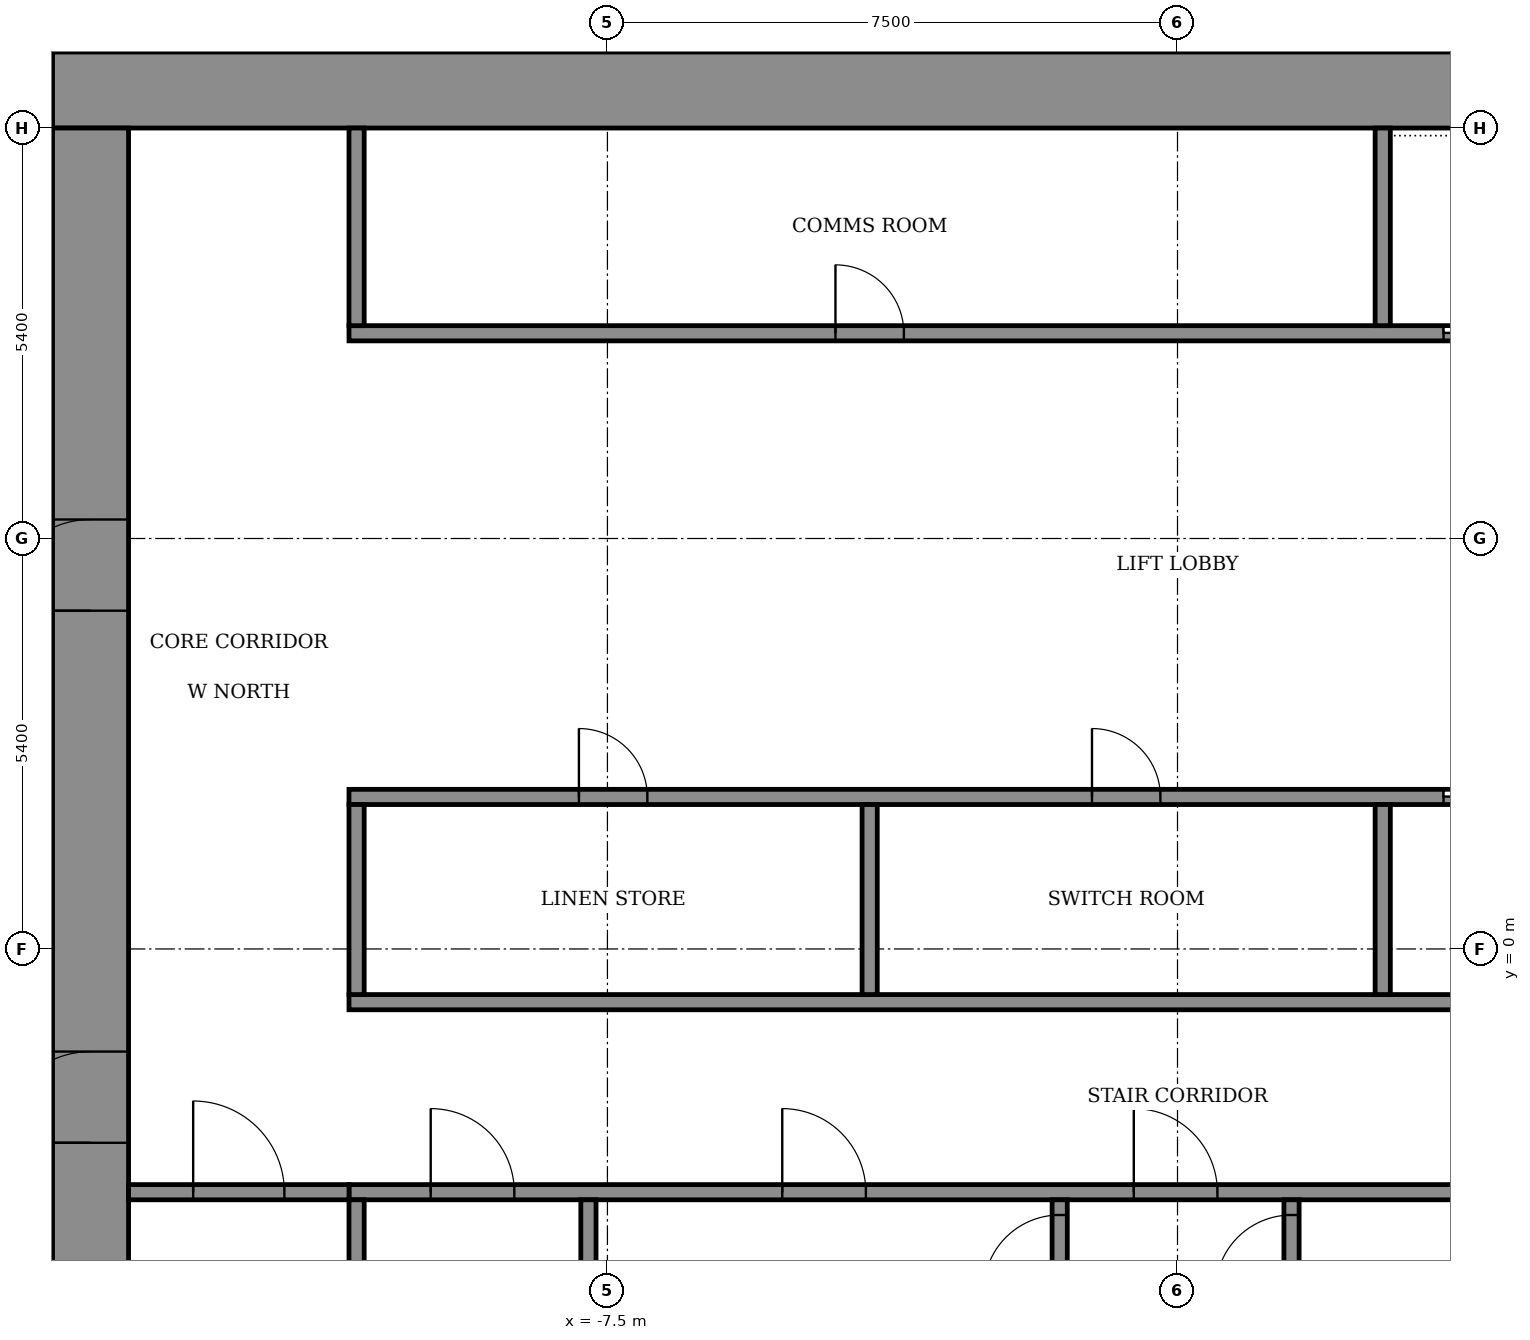
"""IFC4 building model, lengths in metres.
Left out: names, types, materials, properties, quantities, classifications, styles, units other than length and angle.
Written with IfcOpenShell. Run it as: python <this file> out.ifc"""

import sys

from ifc_helpers import new_model, si_unit, direction, frame, frame_2d, origin, place, context, subcontext, project, spatial, rectangle, extrude, element, fill, save


model = new_model("IFC4")
c1 = context("Model", 3, precision=1e-05, world=origin(), true_north=direction((0.0, 1.0)))
c2 = subcontext(c1, "Body", "Model", "MODEL_VIEW")
j1 = project(units=[si_unit("LENGTHUNIT", "METRE"), si_unit("PLANEANGLEUNIT", "RADIAN")], contexts=[c1])
p1 = place(None, origin())
s1 = spatial("IfcSite", under=j1, at=p1, CompositionType="ELEMENT")
p2 = place(p1, origin())
s2 = spatial("IfcBuilding", under=s1, at=p2, CompositionType="ELEMENT")
p3 = place(p2, frame((0.0, 0.0, 125.5)))
s3 = spatial("IfcBuildingStorey", under=s2, at=p3, CompositionType="ELEMENT", Elevation=125.5)
p4 = place(p3, frame((-14.8, 11.3, 0.0), z_axis=(0.0, 0.0, 1.0), x_axis=(1.0, 0.0, 0.0)))
e1 = element("IfcWall", 1, at=p4, inside=s3, PredefinedType="SHEAR", context=c2, shape_type="SweptSolid", body=[
    extrude(rectangle(XDim=29.6, YDim=1.0, at=frame_2d((14.8, 0.0))), origin(), (0.0, 0.0, 1.0), 4.6),
])
p5 = place(p3, frame((-14.3, -10.8, 0.0), z_axis=(0.0, 0.0, 1.0), x_axis=(0.0, 1.0, 0.0)))
e2 = element("IfcWall", 2, at=p5, inside=s3, PredefinedType="SHEAR", context=c2, shape_type="SweptSolid", body=[
    extrude(rectangle(XDim=21.6, YDim=1.0, at=frame_2d((10.8, 0.0))), origin(), (0.0, 0.0, 1.0), 4.6),
])
p6 = place(p5, frame((8.25, 0.0, 0.0)))
e3 = element("IfcOpeningElement", 3, at=p6, cuts=e2, PredefinedType="OPENING", context=c2, shape_type="SweptSolid", body=[
    extrude(rectangle(XDim=1.2, YDim=2.1, at=frame_2d((0.6, 1.05))), frame((0.0, 0.51, 0.0), z_axis=(0.0, -1.0, 0.0), x_axis=(1.0, 0.0, 0.0)), (0.0, 0.0, 1.0), 1.02),
])
p7 = place(p5, frame((15.25, 0.0, 0.0)))
e4 = element("IfcOpeningElement", 4, at=p7, cuts=e2, PredefinedType="OPENING", context=c2, shape_type="SweptSolid", body=[
    extrude(rectangle(XDim=1.2, YDim=2.1, at=frame_2d((0.6, 1.05))), frame((0.0, 0.51, 0.0), z_axis=(0.0, -1.0, 0.0), x_axis=(1.0, 0.0, 0.0)), (0.0, 0.0, 1.0), 1.02),
])
p8 = place(p3, frame((-10.9, -3.2, 0.0), z_axis=(0.0, 0.0, 1.0), x_axis=(1.0, 0.0, 0.0)))
e5 = element("IfcWall", 5, at=p8, inside=s3, PredefinedType="SHEAR", context=c2, shape_type="SweptSolid", body=[
    extrude(rectangle(XDim=21.8, YDim=0.2, at=frame_2d((10.9, 0.0))), origin(), (0.0, 0.0, 1.0), 4.05),
])
p9 = place(p8, frame((1.075, 0.0, 0.0)))
e6 = element("IfcOpeningElement", 6, at=p9, cuts=e5, PredefinedType="OPENING", context=c2, shape_type="SweptSolid", body=[
    extrude(rectangle(XDim=1.1, YDim=2.1, at=frame_2d((0.55, 1.05))), frame((0.0, 0.11, 0.0), z_axis=(0.0, -1.0, 0.0), x_axis=(1.0, 0.0, 0.0)), (0.0, 0.0, 1.0), 0.22),
])
p10 = place(p8, frame((10.325, 0.0, 0.0)))
e7 = element("IfcOpeningElement", 7, at=p10, cuts=e5, PredefinedType="OPENING", context=c2, shape_type="SweptSolid", body=[
    extrude(rectangle(XDim=1.1, YDim=2.1, at=frame_2d((0.55, 1.05))), frame((0.0, 0.11, 0.0), z_axis=(0.0, -1.0, 0.0), x_axis=(1.0, 0.0, 0.0)), (0.0, 0.0, 1.0), 0.22),
])
p11 = place(p8, frame((19.625, 0.0, 0.0)))
e8 = element("IfcOpeningElement", 8, at=p11, cuts=e5, PredefinedType="OPENING", context=c2, shape_type="SweptSolid", body=[
    extrude(rectangle(XDim=1.1, YDim=2.1, at=frame_2d((0.55, 1.05))), frame((0.0, 0.11, 0.0), z_axis=(0.0, -1.0, 0.0), x_axis=(1.0, 0.0, 0.0)), (0.0, 0.0, 1.0), 0.22),
])
p12 = place(p8, frame((5.7, 0.0, 0.0)))
e9 = element("IfcOpeningElement", 9, at=p12, cuts=e5, PredefinedType="OPENING", context=c2, shape_type="SweptSolid", body=[
    extrude(rectangle(XDim=1.1, YDim=2.1, at=frame_2d((0.55, 1.05))), frame((0.0, 0.11, 0.0), z_axis=(0.0, -1.0, 0.0), x_axis=(1.0, 0.0, 0.0)), (0.0, 0.0, 1.0), 0.22),
])
p13 = place(p8, frame((14.975, 0.0, 0.0)))
e10 = element("IfcOpeningElement", 10, at=p13, cuts=e5, PredefinedType="OPENING", context=c2, shape_type="SweptSolid", body=[
    extrude(rectangle(XDim=1.1, YDim=2.1, at=frame_2d((0.55, 1.05))), frame((0.0, 0.11, 0.0), z_axis=(0.0, -1.0, 0.0), x_axis=(1.0, 0.0, 0.0)), (0.0, 0.0, 1.0), 0.22),
])
p14 = place(p3, frame((-10.9, -0.7, 0.0), z_axis=(0.0, 0.0, 1.0), x_axis=(1.0, 0.0, 0.0)))
e11 = element("IfcWall", 11, at=p14, inside=s3, PredefinedType="SHEAR", context=c2, shape_type="SweptSolid", body=[
    extrude(rectangle(XDim=21.8, YDim=0.2, at=frame_2d((10.9, 0.0))), origin(), (0.0, 0.0, 1.0), 4.05),
])
p15 = place(p3, frame((-10.9, 2.0, 0.0), z_axis=(0.0, 0.0, 1.0), x_axis=(1.0, 0.0, 0.0)))
e12 = element("IfcWall", 12, at=p15, inside=s3, PredefinedType="SHEAR", context=c2, shape_type="SweptSolid", body=[
    extrude(rectangle(XDim=21.8, YDim=0.2, at=frame_2d((10.9, 0.0))), origin(), (0.0, 0.0, 1.0), 4.05),
])
p16 = place(p15, frame((14.4, 0.0, 0.0)))
e13 = element("IfcOpeningElement", 13, at=p16, cuts=e12, PredefinedType="OPENING", context=c2, shape_type="SweptSolid", body=[
    extrude(rectangle(XDim=1.1, YDim=2.1, at=frame_2d((0.55, 1.05))), frame((0.0, 0.11, 0.0), z_axis=(0.0, -1.0, 0.0), x_axis=(1.0, 0.0, 0.0)), (0.0, 0.0, 1.0), 0.22),
])
p17 = place(p15, frame((17.1, 0.0, 0.0)))
e14 = element("IfcOpeningElement", 14, at=p17, cuts=e12, PredefinedType="OPENING", context=c2, shape_type="SweptSolid", body=[
    extrude(rectangle(XDim=1.1, YDim=2.1, at=frame_2d((0.55, 1.05))), frame((0.0, 0.11, 0.0), z_axis=(0.0, -1.0, 0.0), x_axis=(1.0, 0.0, 0.0)), (0.0, 0.0, 1.0), 0.22),
])
p18 = place(p15, frame((19.8, 0.0, 0.0)))
e15 = element("IfcOpeningElement", 15, at=p18, cuts=e12, PredefinedType="OPENING", context=c2, shape_type="SweptSolid", body=[
    extrude(rectangle(XDim=1.1, YDim=2.1, at=frame_2d((0.55, 1.05))), frame((0.0, 0.11, 0.0), z_axis=(0.0, -1.0, 0.0), x_axis=(1.0, 0.0, 0.0)), (0.0, 0.0, 1.0), 0.22),
])
p19 = place(p15, frame((3.025, 0.0, 0.0)))
e16 = element("IfcOpeningElement", 16, at=p19, cuts=e12, PredefinedType="OPENING", context=c2, shape_type="SweptSolid", body=[
    extrude(rectangle(XDim=0.9, YDim=2.1, at=frame_2d((0.45, 1.05))), frame((0.0, 0.11, 0.0), z_axis=(0.0, -1.0, 0.0), x_axis=(1.0, 0.0, 0.0)), (0.0, 0.0, 1.0), 0.22),
])
p20 = place(p15, frame((9.775, 0.0, 0.0)))
e17 = element("IfcOpeningElement", 17, at=p20, cuts=e12, PredefinedType="OPENING", context=c2, shape_type="SweptSolid", body=[
    extrude(rectangle(XDim=0.9, YDim=2.1, at=frame_2d((0.45, 1.05))), frame((0.0, 0.11, 0.0), z_axis=(0.0, -1.0, 0.0), x_axis=(1.0, 0.0, 0.0)), (0.0, 0.0, 1.0), 0.22),
])
p21 = place(p3, frame((-10.9, 8.1, 0.0), z_axis=(0.0, 0.0, 1.0), x_axis=(1.0, 0.0, 0.0)))
e18 = element("IfcWall", 18, at=p21, inside=s3, PredefinedType="SHEAR", context=c2, shape_type="SweptSolid", body=[
    extrude(rectangle(XDim=21.8, YDim=0.2, at=frame_2d((10.9, 0.0))), origin(), (0.0, 0.0, 1.0), 4.05),
])
p22 = place(p21, frame((14.4, 0.0, 0.0)))
e19 = element("IfcOpeningElement", 19, at=p22, cuts=e18, PredefinedType="OPENING", context=c2, shape_type="SweptSolid", body=[
    extrude(rectangle(XDim=1.1, YDim=2.1, at=frame_2d((0.55, 1.05))), frame((0.0, 0.11, 0.0), z_axis=(0.0, -1.0, 0.0), x_axis=(1.0, 0.0, 0.0)), (0.0, 0.0, 1.0), 0.22),
])
p23 = place(p21, frame((17.1, 0.0, 0.0)))
e20 = element("IfcOpeningElement", 20, at=p23, cuts=e18, PredefinedType="OPENING", context=c2, shape_type="SweptSolid", body=[
    extrude(rectangle(XDim=1.1, YDim=2.1, at=frame_2d((0.55, 1.05))), frame((0.0, 0.11, 0.0), z_axis=(0.0, -1.0, 0.0), x_axis=(1.0, 0.0, 0.0)), (0.0, 0.0, 1.0), 0.22),
])
p24 = place(p21, frame((19.8, 0.0, 0.0)))
e21 = element("IfcOpeningElement", 21, at=p24, cuts=e18, PredefinedType="OPENING", context=c2, shape_type="SweptSolid", body=[
    extrude(rectangle(XDim=1.1, YDim=2.1, at=frame_2d((0.55, 1.05))), frame((0.0, 0.11, 0.0), z_axis=(0.0, -1.0, 0.0), x_axis=(1.0, 0.0, 0.0)), (0.0, 0.0, 1.0), 0.22),
])
p25 = place(p21, frame((6.4, 0.0, 0.0)))
e22 = element("IfcOpeningElement", 22, at=p25, cuts=e18, PredefinedType="OPENING", context=c2, shape_type="SweptSolid", body=[
    extrude(rectangle(XDim=0.9, YDim=2.1, at=frame_2d((0.45, 1.05))), frame((0.0, 0.11, 0.0), z_axis=(0.0, -1.0, 0.0), x_axis=(1.0, 0.0, 0.0)), (0.0, 0.0, 1.0), 0.22),
])
for number, where, z_axis, x_axis in (
    (23, (-10.8, -10.8, 0.0), (0.0, 0.0, 1.0), (0.0, 1.0, 0.0)),
    (24, (-7.75, -10.8, 0.0), (0.0, 0.0, 1.0), (0.0, 1.0, 0.0)),
):
    element("IfcWall", number, at=place(p3, frame(where, z_axis=z_axis, x_axis=x_axis)), inside=s3, PredefinedType="SHEAR", context=c2, shape_type="SweptSolid", body=[
        extrude(rectangle(XDim=7.5, YDim=0.2, at=frame_2d((3.75, 0.0))), origin(), (0.0, 0.0, 1.0), 4.05),
    ])
p26 = place(p3, frame((-1.55, -10.8, 0.0), z_axis=(0.0, 0.0, 1.0), x_axis=(0.0, 1.0, 0.0)))
e25 = element("IfcWall", 25, at=p26, inside=s3, PredefinedType="SHEAR", context=c2, shape_type="SweptSolid", body=[
    extrude(rectangle(XDim=7.5, YDim=0.2, at=frame_2d((3.75, 0.0))), origin(), (0.0, 0.0, 1.0), 4.05),
])
p27 = place(p26, frame((6.3, 0.0, 0.0)))
e26 = element("IfcOpeningElement", 26, at=p27, cuts=e25, PredefinedType="OPENING", context=c2, shape_type="SweptSolid", body=[
    extrude(rectangle(XDim=1.0, YDim=2.1, at=frame_2d((0.5, 1.05))), frame((0.0, 0.11, 0.0), z_axis=(0.0, -1.0, 0.0), x_axis=(1.0, 0.0, 0.0)), (0.0, 0.0, 1.0), 0.22),
])
p28 = place(p3, frame((1.5, -10.8, 0.0), z_axis=(0.0, 0.0, 1.0), x_axis=(0.0, 1.0, 0.0)))
e27 = element("IfcWall", 27, at=p28, inside=s3, PredefinedType="SHEAR", context=c2, shape_type="SweptSolid", body=[
    extrude(rectangle(XDim=7.5, YDim=0.2, at=frame_2d((3.75, 0.0))), origin(), (0.0, 0.0, 1.0), 4.05),
])
p29 = place(p28, frame((6.3, 0.0, 0.0)))
e28 = element("IfcOpeningElement", 28, at=p29, cuts=e27, PredefinedType="OPENING", context=c2, shape_type="SweptSolid", body=[
    extrude(rectangle(XDim=1.0, YDim=2.1, at=frame_2d((0.5, 1.05))), frame((0.0, 0.11, 0.0), z_axis=(0.0, -1.0, 0.0), x_axis=(1.0, 0.0, 0.0)), (0.0, 0.0, 1.0), 0.22),
])
for number, where, z_axis, x_axis in (
    (29, (-10.8, -0.6, 0.0), (0.0, 0.0, 1.0), (0.0, 1.0, 0.0)),
    (30, (-4.05, -0.6, 0.0), (0.0, 0.0, 1.0), (0.0, 1.0, 0.0)),
):
    element("IfcWall", number, at=place(p3, frame(where, z_axis=z_axis, x_axis=x_axis)), inside=s3, PredefinedType="STANDARD", context=c2, shape_type="SweptSolid", body=[
        extrude(rectangle(XDim=2.5, YDim=0.2, at=frame_2d((1.25, 0.0))), origin(), (0.0, 0.0, 1.0), 4.05),
    ])
p30 = place(p3, frame((2.7, -0.6, 0.0), z_axis=(0.0, 0.0, 1.0), x_axis=(0.0, 1.0, 0.0)))
e31 = element("IfcWall", 31, at=p30, inside=s3, PredefinedType="SHEAR", context=c2, shape_type="SweptSolid", body=[
    extrude(rectangle(XDim=2.5, YDim=0.2, at=frame_2d((1.25, 0.0))), origin(), (0.0, 0.0, 1.0), 4.05),
])
p31 = place(p3, frame((-10.8, 8.2, 0.0), z_axis=(0.0, 0.0, 1.0), x_axis=(0.0, 1.0, 0.0)))
e32 = element("IfcWall", 32, at=p31, inside=s3, PredefinedType="STANDARD", context=c2, shape_type="SweptSolid", body=[
    extrude(rectangle(XDim=2.6, YDim=0.2, at=frame_2d((1.3, 0.0))), origin(), (0.0, 0.0, 1.0), 4.05),
])
p32 = place(p3, frame((2.7, 8.2, 0.0), z_axis=(0.0, 0.0, 1.0), x_axis=(0.0, 1.0, 0.0)))
e33 = element("IfcWall", 33, at=p32, inside=s3, PredefinedType="SHEAR", context=c2, shape_type="SweptSolid", body=[
    extrude(rectangle(XDim=2.6, YDim=0.2, at=frame_2d((1.3, 0.0))), origin(), (0.0, 0.0, 1.0), 4.05),
])
p33 = place(p3, frame((-13.8, -3.2, 0.0), z_axis=(0.0, 0.0, 1.0), x_axis=(1.0, 0.0, 0.0)))
e34 = element("IfcWall", 34, at=p33, inside=s3, PredefinedType="STANDARD", context=c2, shape_type="SweptSolid", body=[
    extrude(rectangle(XDim=2.9, YDim=0.2, at=frame_2d((1.45, 0.0))), origin(), (0.0, 0.0, 1.0), 4.05),
])
p34 = place(p33, frame((0.85, 0.0, 0.0)))
e35 = element("IfcOpeningElement", 35, at=p34, cuts=e34, PredefinedType="OPENING", context=c2, shape_type="SweptSolid", body=[
    extrude(rectangle(XDim=1.2, YDim=2.1, at=frame_2d((0.6, 1.05))), frame((0.0, 0.11, 0.0), z_axis=(0.0, -1.0, 0.0), x_axis=(1.0, 0.0, 0.0)), (0.0, 0.0, 1.0), 0.22),
])
p35 = place(p6, origin())
e36 = element("IfcDoor", 36, at=p35, inside=s3, OperationType="DOUBLE_DOOR_SINGLE_SWING", PredefinedType="DOOR", context=c2, shape_type="SweptSolid", body=[
    extrude(rectangle(XDim=1.2, YDim=2.1, at=frame_2d((0.6, 1.05))), frame((0.0, 0.025, 0.0), z_axis=(0.0, -1.0, 0.0), x_axis=(1.0, 0.0, 0.0)), (0.0, 0.0, 1.0), 0.05),
])
fill(e3, e36)
p36 = place(p7, origin())
e37 = element("IfcDoor", 37, at=p36, inside=s3, OperationType="DOUBLE_DOOR_SINGLE_SWING", PredefinedType="DOOR", context=c2, shape_type="SweptSolid", body=[
    extrude(rectangle(XDim=1.2, YDim=2.1, at=frame_2d((0.6, 1.05))), frame((0.0, 0.025, 0.0), z_axis=(0.0, -1.0, 0.0), x_axis=(1.0, 0.0, 0.0)), (0.0, 0.0, 1.0), 0.05),
])
fill(e4, e37)
p37 = place(p16, origin())
e38 = element("IfcDoor", 38, at=p37, inside=s3, OperationType="SLIDING_TO_LEFT", PredefinedType="DOOR", context=c2, shape_type="SweptSolid", body=[
    extrude(rectangle(XDim=1.1, YDim=2.1, at=frame_2d((0.55, 1.05))), frame((0.0, 0.025, 0.0), z_axis=(0.0, -1.0, 0.0), x_axis=(1.0, 0.0, 0.0)), (0.0, 0.0, 1.0), 0.05),
])
fill(e13, e38)
p38 = place(p22, origin())
e39 = element("IfcDoor", 39, at=p38, inside=s3, OperationType="SLIDING_TO_LEFT", PredefinedType="DOOR", context=c2, shape_type="SweptSolid", body=[
    extrude(rectangle(XDim=1.1, YDim=2.1, at=frame_2d((0.55, 1.05))), frame((0.0, 0.025, 0.0), z_axis=(0.0, -1.0, 0.0), x_axis=(1.0, 0.0, 0.0)), (0.0, 0.0, 1.0), 0.05),
])
fill(e19, e39)
p39 = place(p19, origin())
e40 = element("IfcDoor", 40, at=p39, inside=s3, OperationType="SINGLE_SWING_RIGHT", PredefinedType="DOOR", context=c2, shape_type="SweptSolid", body=[
    extrude(rectangle(XDim=0.9, YDim=2.1, at=frame_2d((0.45, 1.05))), frame((0.0, 0.025, 0.0), z_axis=(0.0, -1.0, 0.0), x_axis=(1.0, 0.0, 0.0)), (0.0, 0.0, 1.0), 0.05),
])
fill(e16, e40)
p40 = place(p20, origin())
e41 = element("IfcDoor", 41, at=p40, inside=s3, OperationType="SINGLE_SWING_LEFT", PredefinedType="DOOR", context=c2, shape_type="SweptSolid", body=[
    extrude(rectangle(XDim=0.9, YDim=2.1, at=frame_2d((0.45, 1.05))), frame((0.0, 0.025, 0.0), z_axis=(0.0, -1.0, 0.0), x_axis=(1.0, 0.0, 0.0)), (0.0, 0.0, 1.0), 0.05),
])
fill(e17, e41)
p41 = place(p25, origin())
e42 = element("IfcDoor", 42, at=p41, inside=s3, OperationType="SINGLE_SWING_LEFT", PredefinedType="DOOR", context=c2, shape_type="SweptSolid", body=[
    extrude(rectangle(XDim=0.9, YDim=2.1, at=frame_2d((0.45, 1.05))), frame((0.0, 0.025, 0.0), z_axis=(0.0, -1.0, 0.0), x_axis=(1.0, 0.0, 0.0)), (0.0, 0.0, 1.0), 0.05),
])
fill(e22, e42)
p42 = place(p9, origin())
e43 = element("IfcDoor", 43, at=p42, inside=s3, OperationType="SINGLE_SWING_RIGHT", PredefinedType="DOOR", context=c2, shape_type="SweptSolid", body=[
    extrude(rectangle(XDim=1.1, YDim=2.1, at=frame_2d((0.55, 1.05))), frame((0.0, 0.025, 0.0), z_axis=(0.0, -1.0, 0.0), x_axis=(1.0, 0.0, 0.0)), (0.0, 0.0, 1.0), 0.05),
])
fill(e6, e43)
p43 = place(p10, origin())
e44 = element("IfcDoor", 44, at=p43, inside=s3, OperationType="SINGLE_SWING_RIGHT", PredefinedType="DOOR", context=c2, shape_type="SweptSolid", body=[
    extrude(rectangle(XDim=1.1, YDim=2.1, at=frame_2d((0.55, 1.05))), frame((0.0, 0.025, 0.0), z_axis=(0.0, -1.0, 0.0), x_axis=(1.0, 0.0, 0.0)), (0.0, 0.0, 1.0), 0.05),
])
fill(e7, e44)
p44 = place(p12, origin())
e45 = element("IfcDoor", 45, at=p44, inside=s3, OperationType="SINGLE_SWING_LEFT", PredefinedType="DOOR", context=c2, shape_type="SweptSolid", body=[
    extrude(rectangle(XDim=1.1, YDim=2.1, at=frame_2d((0.55, 1.05))), frame((0.0, 0.025, 0.0), z_axis=(0.0, -1.0, 0.0), x_axis=(1.0, 0.0, 0.0)), (0.0, 0.0, 1.0), 0.05),
])
fill(e9, e45)
p45 = place(p27, origin())
e46 = element("IfcDoor", 46, at=p45, inside=s3, OperationType="SINGLE_SWING_RIGHT", PredefinedType="DOOR", context=c2, shape_type="SweptSolid", body=[
    extrude(rectangle(XDim=1.0, YDim=2.1, at=frame_2d((0.5, 1.05))), frame((0.0, 0.025, 0.0), z_axis=(0.0, -1.0, 0.0), x_axis=(1.0, 0.0, 0.0)), (0.0, 0.0, 1.0), 0.05),
])
fill(e26, e46)
p46 = place(p29, origin())
e47 = element("IfcDoor", 47, at=p46, inside=s3, OperationType="SINGLE_SWING_RIGHT", PredefinedType="DOOR", context=c2, shape_type="SweptSolid", body=[
    extrude(rectangle(XDim=1.0, YDim=2.1, at=frame_2d((0.5, 1.05))), frame((0.0, 0.025, 0.0), z_axis=(0.0, -1.0, 0.0), x_axis=(1.0, 0.0, 0.0)), (0.0, 0.0, 1.0), 0.05),
])
fill(e28, e47)
p47 = place(p34, origin())
e48 = element("IfcDoor", 48, at=p47, inside=s3, OperationType="SINGLE_SWING_LEFT", PredefinedType="DOOR", context=c2, shape_type="SweptSolid", body=[
    extrude(rectangle(XDim=1.2, YDim=2.1, at=frame_2d((0.6, 1.05))), frame((0.0, 0.025, 0.0), z_axis=(0.0, -1.0, 0.0), x_axis=(1.0, 0.0, 0.0)), (0.0, 0.0, 1.0), 0.05),
])
fill(e35, e48)
save(model, sys.argv[1])
